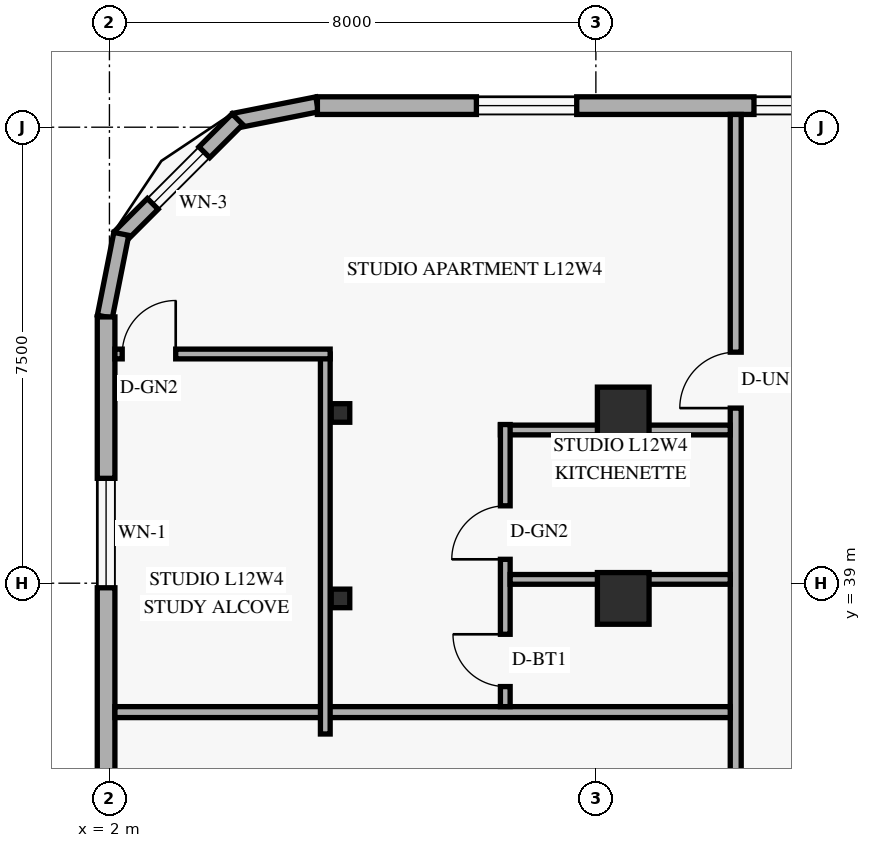
"""IFC4 building model, lengths in metres.
Left out: names, types, materials, properties, quantities, classifications, styles, units other than length and angle.
Written with IfcOpenShell. Run it as: python <this file> out.ifc"""

import sys

from ifc_helpers import new_model, si_unit, direction, frame, frame_2d, origin, origin_2d, place, context, subcontext, project, spatial, rectangle, hollow_rectangle, extrude, element, fill, save


model = new_model("IFC4")
c1 = context("Model", 3, precision=1e-05, world=origin(), true_north=direction((0.0, 1.0)))
c2 = subcontext(c1, "Body", "Model", "MODEL_VIEW")
j1 = project(units=[si_unit("LENGTHUNIT", "METRE"), si_unit("PLANEANGLEUNIT", "RADIAN")], contexts=[c1])
p1 = place(None, origin())
s1 = spatial("IfcSite", under=j1, at=p1, CompositionType="ELEMENT")
p2 = place(p1, origin())
s2 = spatial("IfcBuilding", under=s1, at=p2, CompositionType="ELEMENT")
p3 = place(p2, frame((0.0, 0.0, 49.2)))
s3 = spatial("IfcBuildingStorey", under=s2, at=p3, CompositionType="ELEMENT", Elevation=49.2)
for number, where, z_axis, x_axis in (
    (1, (5.8, 38.75, 0.0), (0.0, 0.0, 1.0), (1.0, 0.0, 0.0)),
    (2, (5.8, 41.8, 0.0), (0.0, 0.0, 1.0), (1.0, 0.0, 0.0)),
):
    element("IfcColumn", number, at=place(p3, frame(where, z_axis=z_axis, x_axis=x_axis)), inside=s3, PredefinedType="COLUMN", context=c2, shape_type="SweptSolid", body=[
        extrude(hollow_rectangle(XDim=0.305, YDim=0.305, WallThickness=0.013, at=origin_2d()), origin(), (0.0, 0.0, 1.0), 3.6),
    ])
for number, where, z_axis, x_axis in (
    (3, (10.45, 38.75, 0.0), (0.0, 0.0, 1.0), (1.0, 0.0, 0.0)),
    (4, (10.45, 41.8, 0.0), (0.0, 0.0, 1.0), (1.0, 0.0, 0.0)),
):
    element("IfcColumn", number, at=place(p3, frame(where, z_axis=z_axis, x_axis=x_axis)), inside=s3, PredefinedType="COLUMN", context=c2, shape_type="SweptSolid", body=[
        extrude(rectangle(XDim=0.85, YDim=0.85, at=origin_2d()), origin(), (0.0, 0.0, 1.0), 3.6),
    ])
p4 = place(p3, frame((5.417, 46.876, 0.0), z_axis=(0.0, 0.0, 1.0), x_axis=(-0.980809899341, -0.19496651342, 0.0)))
e5 = element("IfcWall", 5, at=p4, inside=s3, PredefinedType="SOLIDWALL", context=c2, shape_type="SweptSolid", body=[
    extrude(rectangle(XDim=1.389, YDim=0.25, at=frame_2d((0.694, 0.0))), origin(), (0.0, 0.0, 1.0), 3.36),
])
p5 = place(p3, frame((4.105, 46.632, 0.0), z_axis=(0.0, 0.0, 1.0), x_axis=(-0.707106781187, -0.707106781187, 0.0)))
e6 = element("IfcWall", 6, at=p5, inside=s3, PredefinedType="SOLIDWALL", context=c2, shape_type="SweptSolid", body=[
    extrude(rectangle(XDim=2.739, YDim=0.25, at=frame_2d((1.37, 0.0))), origin(), (0.0, 0.0, 1.0), 3.36),
])
p6 = place(p5, frame((0.77, 0.0, 0.85)))
e7 = element("IfcOpeningElement", 7, at=p6, cuts=e6, PredefinedType="OPENING", context=c2, shape_type="SweptSolid", body=[
    extrude(rectangle(XDim=1.2, YDim=1.5, at=frame_2d((0.6, 0.75))), frame((0.0, 0.135, 0.0), z_axis=(0.0, -1.0, 0.0), x_axis=(1.0, 0.0, 0.0)), (0.0, 0.0, 1.0), 0.27),
])
p7 = place(p3, frame((2.195, 44.746, 0.0), z_axis=(0.0, 0.0, 1.0), x_axis=(-0.19496651342, -0.980809899341, 0.0)))
e8 = element("IfcWall", 8, at=p7, inside=s3, PredefinedType="SOLIDWALL", context=c2, shape_type="SweptSolid", body=[
    extrude(rectangle(XDim=1.389, YDim=0.25, at=frame_2d((0.694, 0.0))), origin(), (0.0, 0.0, 1.0), 3.36),
])
p8 = place(p3, frame((44.98, 46.855, 0.0), z_axis=(0.0, 0.0, 1.0), x_axis=(-1.0, 0.0, 0.0)))
e9 = element("IfcWall", 9, at=p8, inside=s3, PredefinedType="SOLIDWALL", context=c2, shape_type="SweptSolid", body=[
    extrude(rectangle(XDim=39.56, YDim=0.29, at=frame_2d((19.78, 0.0))), origin(), (0.0, 0.0, 1.0), 3.36),
])
p9 = place(p8, frame((35.295, 0.0, 0.85)))
e10 = element("IfcOpeningElement", 10, at=p9, cuts=e9, PredefinedType="OPENING", context=c2, shape_type="SweptSolid", body=[
    extrude(rectangle(XDim=1.65, YDim=1.6, at=frame_2d((0.825, 0.8))), frame((0.0, 0.155, 0.0), z_axis=(0.0, -1.0, 0.0), x_axis=(1.0, 0.0, 0.0)), (0.0, 0.0, 1.0), 0.31),
])
p10 = place(p8, frame((31.18, 0.0, 0.85)))
e11 = element("IfcOpeningElement", 11, at=p10, cuts=e9, PredefinedType="OPENING", context=c2, shape_type="SweptSolid", body=[
    extrude(rectangle(XDim=1.2, YDim=1.5, at=frame_2d((0.6, 0.75))), frame((0.0, 0.155, 0.0), z_axis=(0.0, -1.0, 0.0), x_axis=(1.0, 0.0, 0.0)), (0.0, 0.0, 1.0), 0.31),
])
p11 = place(p8, frame((25.684, 0.0, 0.85)))
e12 = element("IfcOpeningElement", 12, at=p11, cuts=e9, PredefinedType="OPENING", context=c2, shape_type="SweptSolid", body=[
    extrude(rectangle(XDim=1.65, YDim=1.6, at=frame_2d((0.825, 0.8))), frame((0.0, 0.155, 0.0), z_axis=(0.0, -1.0, 0.0), x_axis=(1.0, 0.0, 0.0)), (0.0, 0.0, 1.0), 0.31),
])
p12 = place(p8, frame((18.649, 0.0, 0.85)))
e13 = element("IfcOpeningElement", 13, at=p12, cuts=e9, PredefinedType="OPENING", context=c2, shape_type="SweptSolid", body=[
    extrude(rectangle(XDim=1.65, YDim=1.6, at=frame_2d((0.825, 0.8))), frame((0.0, 0.155, 0.0), z_axis=(0.0, -1.0, 0.0), x_axis=(1.0, 0.0, 0.0)), (0.0, 0.0, 1.0), 0.31),
])
p13 = place(p8, frame((12.359, 0.0, 0.85)))
e14 = element("IfcOpeningElement", 14, at=p13, cuts=e9, PredefinedType="OPENING", context=c2, shape_type="SweptSolid", body=[
    extrude(rectangle(XDim=1.65, YDim=1.6, at=frame_2d((0.825, 0.8))), frame((0.0, 0.155, 0.0), z_axis=(0.0, -1.0, 0.0), x_axis=(1.0, 0.0, 0.0)), (0.0, 0.0, 1.0), 0.31),
])
p14 = place(p8, frame((7.895, 0.0, 0.85)))
e15 = element("IfcOpeningElement", 15, at=p14, cuts=e9, PredefinedType="OPENING", context=c2, shape_type="SweptSolid", body=[
    extrude(rectangle(XDim=1.2, YDim=1.5, at=frame_2d((0.6, 0.75))), frame((0.0, 0.155, 0.0), z_axis=(0.0, -1.0, 0.0), x_axis=(1.0, 0.0, 0.0)), (0.0, 0.0, 1.0), 0.31),
])
p15 = place(p8, frame((5.183, 0.0, 0.85)))
e16 = element("IfcOpeningElement", 16, at=p15, cuts=e9, PredefinedType="OPENING", context=c2, shape_type="SweptSolid", body=[
    extrude(rectangle(XDim=1.65, YDim=1.6, at=frame_2d((0.825, 0.8))), frame((0.0, 0.155, 0.0), z_axis=(0.0, -1.0, 0.0), x_axis=(1.0, 0.0, 0.0)), (0.0, 0.0, 1.0), 0.31),
])
p16 = place(p8, frame((1.468, 0.0, 0.85)))
e17 = element("IfcOpeningElement", 17, at=p16, cuts=e9, PredefinedType="OPENING", context=c2, shape_type="SweptSolid", body=[
    extrude(rectangle(XDim=1.65, YDim=1.6, at=frame_2d((0.825, 0.8))), frame((0.0, 0.155, 0.0), z_axis=(0.0, -1.0, 0.0), x_axis=(1.0, 0.0, 0.0)), (0.0, 0.0, 1.0), 0.31),
])
p17 = place(p3, frame((1.945, 43.38, 0.0), z_axis=(0.0, 0.0, 1.0), x_axis=(0.0, -1.0, 0.0)))
e18 = element("IfcWall", 18, at=p17, inside=s3, PredefinedType="SOLIDWALL", context=c2, shape_type="SweptSolid", body=[
    extrude(rectangle(XDim=38.76, YDim=0.29, at=frame_2d((19.38, 0.0))), origin(), (0.0, 0.0, 1.0), 3.36),
])
p18 = place(p17, frame((33.92, 0.0, 0.85)))
e19 = element("IfcOpeningElement", 19, at=p18, cuts=e18, PredefinedType="OPENING", context=c2, shape_type="SweptSolid", body=[
    extrude(rectangle(XDim=1.8, YDim=1.6, at=frame_2d((0.9, 0.8))), frame((0.0, 0.155, 0.0), z_axis=(0.0, -1.0, 0.0), x_axis=(1.0, 0.0, 0.0)), (0.0, 0.0, 1.0), 0.31),
])
p19 = place(p17, frame((27.035, 0.0, 0.85)))
e20 = element("IfcOpeningElement", 20, at=p19, cuts=e18, PredefinedType="OPENING", context=c2, shape_type="SweptSolid", body=[
    extrude(rectangle(XDim=1.8, YDim=1.6, at=frame_2d((0.9, 0.8))), frame((0.0, 0.155, 0.0), z_axis=(0.0, -1.0, 0.0), x_axis=(1.0, 0.0, 0.0)), (0.0, 0.0, 1.0), 0.31),
])
p20 = place(p17, frame((20.825, 0.0, 0.85)))
e21 = element("IfcOpeningElement", 21, at=p20, cuts=e18, PredefinedType="OPENING", context=c2, shape_type="SweptSolid", body=[
    extrude(rectangle(XDim=1.8, YDim=1.6, at=frame_2d((0.9, 0.8))), frame((0.0, 0.155, 0.0), z_axis=(0.0, -1.0, 0.0), x_axis=(1.0, 0.0, 0.0)), (0.0, 0.0, 1.0), 0.31),
])
p21 = place(p17, frame((14.615, 0.0, 0.85)))
e22 = element("IfcOpeningElement", 22, at=p21, cuts=e18, PredefinedType="OPENING", context=c2, shape_type="SweptSolid", body=[
    extrude(rectangle(XDim=1.8, YDim=1.6, at=frame_2d((0.9, 0.8))), frame((0.0, 0.155, 0.0), z_axis=(0.0, -1.0, 0.0), x_axis=(1.0, 0.0, 0.0)), (0.0, 0.0, 1.0), 0.31),
])
p22 = place(p17, frame((8.635, 0.0, 0.85)))
e23 = element("IfcOpeningElement", 23, at=p22, cuts=e18, PredefinedType="OPENING", context=c2, shape_type="SweptSolid", body=[
    extrude(rectangle(XDim=1.8, YDim=1.6, at=frame_2d((0.9, 0.8))), frame((0.0, 0.155, 0.0), z_axis=(0.0, -1.0, 0.0), x_axis=(1.0, 0.0, 0.0)), (0.0, 0.0, 1.0), 0.31),
])
p23 = place(p17, frame((2.655, 0.0, 0.85)))
e24 = element("IfcOpeningElement", 24, at=p23, cuts=e18, PredefinedType="OPENING", context=c2, shape_type="SweptSolid", body=[
    extrude(rectangle(XDim=1.8, YDim=1.6, at=frame_2d((0.9, 0.8))), frame((0.0, 0.155, 0.0), z_axis=(0.0, -1.0, 0.0), x_axis=(1.0, 0.0, 0.0)), (0.0, 0.0, 1.0), 0.31),
])
p24 = place(p3, frame((12.3, 1.29, 0.0), z_axis=(0.0, 0.0, 1.0), x_axis=(0.0, 1.0, 0.0)))
e25 = element("IfcWall", 25, at=p24, inside=s3, PredefinedType="STANDARD", context=c2, shape_type="SweptSolid", body=[
    extrude(rectangle(XDim=45.42, YDim=0.18, at=frame_2d((22.71, 0.0))), origin(), (0.0, 0.0, 1.0), 2.649),
])
p25 = place(p24, frame((5.27, 0.0, 0.0)))
e26 = element("IfcOpeningElement", 26, at=p25, cuts=e25, PredefinedType="OPENING", context=c2, shape_type="SweptSolid", body=[
    extrude(rectangle(XDim=0.92, YDim=2.15, at=frame_2d((0.46, 1.075))), frame((0.0, 0.1, 0.0), z_axis=(0.0, -1.0, 0.0), x_axis=(1.0, 0.0, 0.0)), (0.0, 0.0, 1.0), 0.2),
])
p26 = place(p24, frame((16.21, 0.0, 0.0)))
e27 = element("IfcOpeningElement", 27, at=p26, cuts=e25, PredefinedType="OPENING", context=c2, shape_type="SweptSolid", body=[
    extrude(rectangle(XDim=0.92, YDim=2.15, at=frame_2d((0.46, 1.075))), frame((0.0, 0.1, 0.0), z_axis=(0.0, -1.0, 0.0), x_axis=(1.0, 0.0, 0.0)), (0.0, 0.0, 1.0), 0.2),
])
p27 = place(p24, frame((28.63, 0.0, 0.0)))
e28 = element("IfcOpeningElement", 28, at=p27, cuts=e25, PredefinedType="OPENING", context=c2, shape_type="SweptSolid", body=[
    extrude(rectangle(XDim=0.92, YDim=2.15, at=frame_2d((0.46, 1.075))), frame((0.0, 0.1, 0.0), z_axis=(0.0, -1.0, 0.0), x_axis=(1.0, 0.0, 0.0)), (0.0, 0.0, 1.0), 0.2),
])
p28 = place(p24, frame((40.59, 0.0, 0.0)))
e29 = element("IfcOpeningElement", 29, at=p28, cuts=e25, PredefinedType="OPENING", context=c2, shape_type="SweptSolid", body=[
    extrude(rectangle(XDim=0.92, YDim=2.15, at=frame_2d((0.46, 1.075))), frame((0.0, 0.1, 0.0), z_axis=(0.0, -1.0, 0.0), x_axis=(1.0, 0.0, 0.0)), (0.0, 0.0, 1.0), 0.2),
])
p29 = place(p3, frame((2.09, 36.88, 0.0), z_axis=(0.0, 0.0, 1.0), x_axis=(1.0, 0.0, 0.0)))
e30 = element("IfcWall", 30, at=p29, inside=s3, PredefinedType="PARTITIONING", context=c2, shape_type="SweptSolid", body=[
    extrude(rectangle(XDim=10.12, YDim=0.18, at=frame_2d((5.06, 0.0))), origin(), (0.0, 0.0, 1.0), 2.649),
])
p30 = place(p3, frame((8.43, 41.52, 0.0), z_axis=(0.0, 0.0, 1.0), x_axis=(1.0, 0.0, 0.0)))
e31 = element("IfcWall", 31, at=p30, inside=s3, PredefinedType="PLUMBINGWALL", context=c2, shape_type="SweptSolid", body=[
    extrude(rectangle(XDim=3.78, YDim=0.16, at=frame_2d((1.89, 0.0))), origin(), (0.0, 0.0, 1.0), 3.36),
])
p31 = place(p3, frame((8.51, 36.97, 0.0), z_axis=(0.0, 0.0, 1.0), x_axis=(0.0, 1.0, 0.0)))
e32 = element("IfcWall", 32, at=p31, inside=s3, PredefinedType="PLUMBINGWALL", context=c2, shape_type="SweptSolid", body=[
    extrude(rectangle(XDim=4.64, YDim=0.16, at=frame_2d((2.32, 0.0))), origin(), (0.0, 0.0, 1.0), 2.649),
])
p32 = place(p31, frame((0.33, 0.0, 0.0)))
e33 = element("IfcOpeningElement", 33, at=p32, cuts=e32, PredefinedType="OPENING", context=c2, shape_type="SweptSolid", body=[
    extrude(rectangle(XDim=0.86, YDim=2.12, at=frame_2d((0.43, 1.06))), frame((0.0, 0.09, 0.0), z_axis=(0.0, -1.0, 0.0), x_axis=(1.0, 0.0, 0.0)), (0.0, 0.0, 1.0), 0.18),
])
p33 = place(p31, frame((2.423, 0.0, 0.0)))
e34 = element("IfcOpeningElement", 34, at=p33, cuts=e32, PredefinedType="OPENING", context=c2, shape_type="SweptSolid", body=[
    extrude(rectangle(XDim=0.88, YDim=2.12, at=frame_2d((0.44, 1.06))), frame((0.0, 0.09, 0.0), z_axis=(0.0, -1.0, 0.0), x_axis=(1.0, 0.0, 0.0)), (0.0, 0.0, 1.0), 0.18),
])
p34 = place(p3, frame((8.59, 39.063, 0.0), z_axis=(0.0, 0.0, 1.0), x_axis=(1.0, 0.0, 0.0)))
e35 = element("IfcWall", 35, at=p34, inside=s3, PredefinedType="PLUMBINGWALL", context=c2, shape_type="SweptSolid", body=[
    extrude(rectangle(XDim=3.62, YDim=0.16, at=frame_2d((1.81, 0.0))), origin(), (0.0, 0.0, 1.0), 3.36),
])
p35 = place(p3, frame((5.55, 36.52, 0.0), z_axis=(0.0, 0.0, 1.0), x_axis=(0.0, 1.0, 0.0)))
e36 = element("IfcWall", 36, at=p35, inside=s3, PredefinedType="PARTITIONING", context=c2, shape_type="SweptSolid", body=[
    extrude(rectangle(XDim=6.25, YDim=0.16, at=frame_2d((3.125, 0.0))), origin(), (0.0, 0.0, 1.0), 3.36),
])
p36 = place(p3, frame((2.09, 42.77, 0.0), z_axis=(0.0, 0.0, 1.0), x_axis=(1.0, 0.0, 0.0)))
e37 = element("IfcWall", 37, at=p36, inside=s3, PredefinedType="PARTITIONING", context=c2, shape_type="SweptSolid", body=[
    extrude(rectangle(XDim=3.54, YDim=0.16, at=frame_2d((1.77, 0.0))), origin(), (0.0, 0.0, 1.0), 3.36),
])
p37 = place(p36, frame((0.12, 0.0, 0.0)))
e38 = element("IfcOpeningElement", 38, at=p37, cuts=e37, PredefinedType="OPENING", context=c2, shape_type="SweptSolid", body=[
    extrude(rectangle(XDim=0.88, YDim=2.12, at=frame_2d((0.44, 1.06))), frame((0.0, 0.09, 0.0), z_axis=(0.0, -1.0, 0.0), x_axis=(1.0, 0.0, 0.0)), (0.0, 0.0, 1.0), 0.18),
])
p38 = place(p6, origin())
e39 = element("IfcWindow", 39, at=p38, inside=s3, PartitioningType="SINGLE_PANEL", PredefinedType="WINDOW", context=c2, shape_type="SweptSolid", body=[
    extrude(rectangle(XDim=1.2, YDim=1.5, at=frame_2d((0.6, 0.75))), frame((0.0, 0.03, 0.0), z_axis=(0.0, -1.0, 0.0), x_axis=(1.0, 0.0, 0.0)), (0.0, 0.0, 1.0), 0.06),
])
fill(e7, e39)
p39 = place(p9, origin())
e40 = element("IfcWindow", 40, at=p39, inside=s3, PartitioningType="SINGLE_PANEL", PredefinedType="WINDOW", context=c2, shape_type="SweptSolid", body=[
    extrude(rectangle(XDim=1.65, YDim=1.6, at=frame_2d((0.825, 0.8))), frame((0.0, 0.03, 0.0), z_axis=(0.0, -1.0, 0.0), x_axis=(1.0, 0.0, 0.0)), (0.0, 0.0, 1.0), 0.06),
])
fill(e10, e40)
p40 = place(p10, origin())
e41 = element("IfcWindow", 41, at=p40, inside=s3, PartitioningType="SINGLE_PANEL", PredefinedType="WINDOW", context=c2, shape_type="SweptSolid", body=[
    extrude(rectangle(XDim=1.2, YDim=1.5, at=frame_2d((0.6, 0.75))), frame((0.0, 0.03, 0.0), z_axis=(0.0, -1.0, 0.0), x_axis=(1.0, 0.0, 0.0)), (0.0, 0.0, 1.0), 0.06),
])
fill(e11, e41)
p41 = place(p23, origin())
e42 = element("IfcWindow", 42, at=p41, inside=s3, PartitioningType="SINGLE_PANEL", PredefinedType="WINDOW", context=c2, shape_type="SweptSolid", body=[
    extrude(rectangle(XDim=1.8, YDim=1.6, at=frame_2d((0.9, 0.8))), frame((0.0, 0.03, 0.0), z_axis=(0.0, -1.0, 0.0), x_axis=(1.0, 0.0, 0.0)), (0.0, 0.0, 1.0), 0.06),
])
fill(e24, e42)
p42 = place(p37, origin())
e43 = element("IfcDoor", 43, at=p42, inside=s3, OperationType="SINGLE_SWING_RIGHT", PredefinedType="DOOR", context=c2, shape_type="SweptSolid", body=[
    extrude(rectangle(XDim=0.88, YDim=2.12, at=frame_2d((0.44, 1.06))), frame((0.0, 0.025, 0.0), z_axis=(0.0, -1.0, 0.0), x_axis=(1.0, 0.0, 0.0)), (0.0, 0.0, 1.0), 0.05),
])
fill(e38, e43)
p43 = place(p28, origin())
e44 = element("IfcDoor", 44, at=p43, inside=s3, OperationType="SINGLE_SWING_LEFT", PredefinedType="DOOR", context=c2, shape_type="SweptSolid", body=[
    extrude(rectangle(XDim=0.92, YDim=2.15, at=frame_2d((0.46, 1.075))), frame((0.0, 0.025, 0.0), z_axis=(0.0, -1.0, 0.0), x_axis=(1.0, 0.0, 0.0)), (0.0, 0.0, 1.0), 0.05),
])
fill(e29, e44)
p44 = place(p32, origin())
e45 = element("IfcDoor", 45, at=p44, inside=s3, OperationType="SINGLE_SWING_RIGHT", PredefinedType="DOOR", context=c2, shape_type="SweptSolid", body=[
    extrude(rectangle(XDim=0.86, YDim=2.12, at=frame_2d((0.43, 1.06))), frame((0.0, 0.025, 0.0), z_axis=(0.0, -1.0, 0.0), x_axis=(1.0, 0.0, 0.0)), (0.0, 0.0, 1.0), 0.05),
])
fill(e33, e45)
p45 = place(p33, origin())
e46 = element("IfcDoor", 46, at=p45, inside=s3, OperationType="SINGLE_SWING_LEFT", PredefinedType="DOOR", context=c2, shape_type="SweptSolid", body=[
    extrude(rectangle(XDim=0.88, YDim=2.12, at=frame_2d((0.44, 1.06))), frame((0.0, 0.025, 0.0), z_axis=(0.0, -1.0, 0.0), x_axis=(1.0, 0.0, 0.0)), (0.0, 0.0, 1.0), 0.05),
])
fill(e34, e46)
save(model, sys.argv[1])
